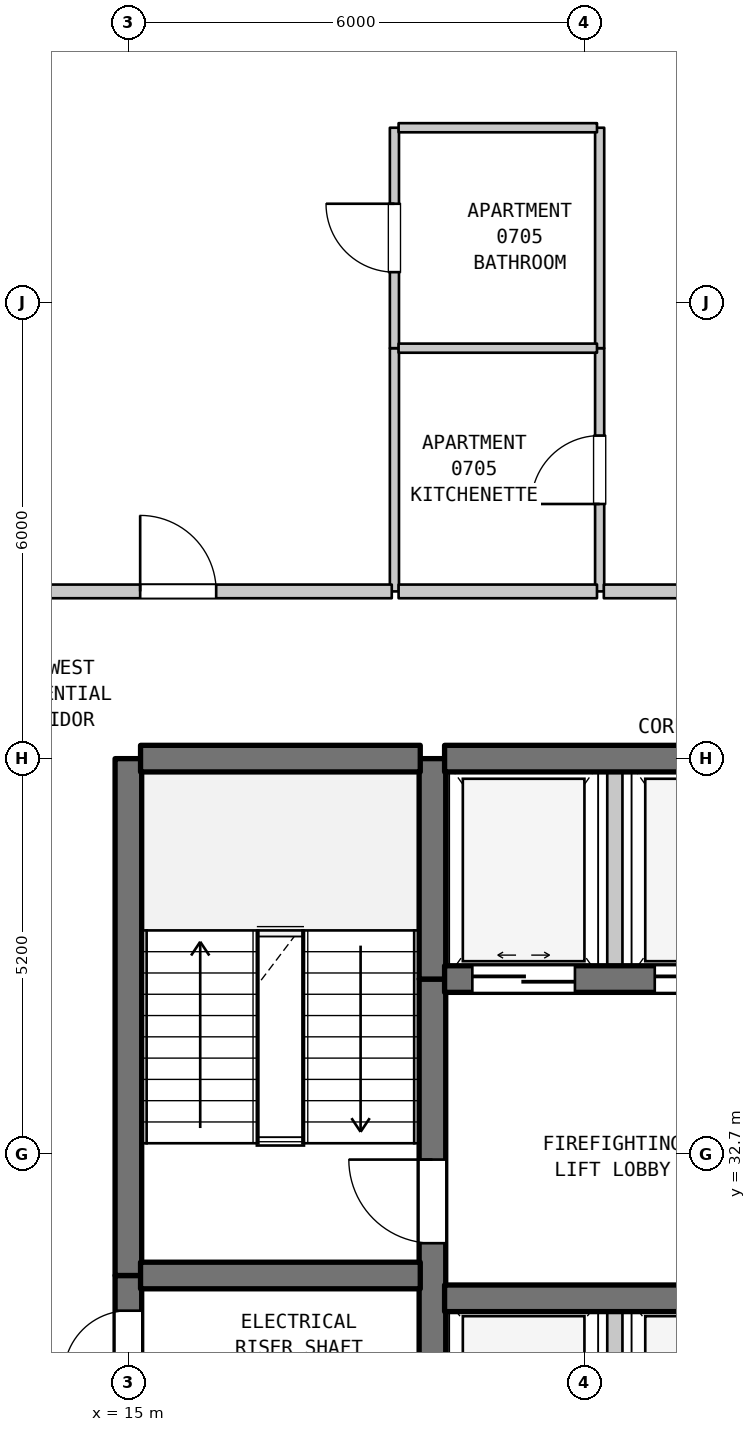
"""IFC4 building model, lengths in metres.
Left out: names, types, materials, properties, quantities, classifications, styles, units other than length and angle.
Written with IfcOpenShell. Run it as: python <this file> out.ifc"""

import sys

from ifc_helpers import new_model, si_unit, direction, frame, frame_2d, origin, place, context, subcontext, project, spatial, rectangle, extrude, element, fill, save


model = new_model("IFC4")
c1 = context("Model", 3, precision=1e-05, world=origin(), true_north=direction((0.0, 1.0)))
c2 = subcontext(c1, "Body", "Model", "MODEL_VIEW")
j1 = project(units=[si_unit("LENGTHUNIT", "METRE"), si_unit("PLANEANGLEUNIT", "RADIAN")], contexts=[c1])
p1 = place(None, origin())
s1 = spatial("IfcSite", under=j1, at=p1, CompositionType="ELEMENT")
p2 = place(p1, origin())
s2 = spatial("IfcBuilding", under=s1, at=p2, CompositionType="ELEMENT")
p3 = place(p2, frame((0.0, 0.0, 35.1)))
s3 = spatial("IfcBuildingStorey", under=s2, at=p3, CompositionType="ELEMENT", Elevation=35.1)
p4 = place(p3, frame((15.0, 29.5, 0.0), z_axis=(0.0, 0.0, 1.0), x_axis=(0.0, 1.0, 0.0)))
e1 = element("IfcWall", 1, at=p4, inside=s3, PredefinedType="SHEAR", context=c2, shape_type="SweptSolid", body=[
    extrude(rectangle(XDim=1.6, YDim=0.35, at=frame_2d((0.8, 0.0))), origin(), (0.0, 0.0, 1.0), 3.385),
])
p5 = place(p4, frame((0.287, 0.0, 0.0)))
e2 = element("IfcOpeningElement", 2, at=p5, cuts=e1, PredefinedType="OPENING", context=c2, shape_type="SweptSolid", body=[
    extrude(rectangle(XDim=0.85, YDim=2.1, at=frame_2d((0.425, 1.05))), frame((0.0, 0.185, 0.0), z_axis=(0.0, -1.0, 0.0), x_axis=(1.0, 0.0, 0.0)), (0.0, 0.0, 1.0), 0.37),
])
p6 = place(p3, frame((15.0, 31.1, 0.0), z_axis=(0.0, 0.0, 1.0), x_axis=(0.0, 1.0, 0.0)))
e3 = element("IfcWall", 3, at=p6, inside=s3, PredefinedType="SHEAR", context=c2, shape_type="SweptSolid", body=[
    extrude(rectangle(XDim=6.8, YDim=0.35, at=frame_2d((3.4, 0.0))), origin(), (0.0, 0.0, 1.0), 3.385),
])
p7 = place(p3, frame((18.5, 40.1, 0.0), z_axis=(0.0, 0.0, 1.0), x_axis=(0.0, 1.0, 0.0)))
e4 = element("IfcWall", 4, at=p7, inside=s3, PredefinedType="PARTITIONING", context=c2, shape_type="SweptSolid", body=[
    extrude(rectangle(XDim=3.2, YDim=0.12, at=frame_2d((1.6, 0.0))), origin(), (0.0, 0.0, 1.0), 3.385),
])
p8 = place(p3, frame((18.5, 43.3, 0.0), z_axis=(0.0, 0.0, 1.0), x_axis=(0.0, 1.0, 0.0)))
e5 = element("IfcWall", 5, at=p8, inside=s3, PredefinedType="PARTITIONING", context=c2, shape_type="SweptSolid", body=[
    extrude(rectangle(XDim=2.9, YDim=0.12, at=frame_2d((1.45, 0.0))), origin(), (0.0, 0.0, 1.0), 3.385),
])
p9 = place(p8, frame((1.0, 0.0, 0.0)))
e6 = element("IfcOpeningElement", 6, at=p9, cuts=e5, PredefinedType="OPENING", context=c2, shape_type="SweptSolid", body=[
    extrude(rectangle(XDim=0.9, YDim=2.1, at=frame_2d((0.45, 1.05))), frame((0.0, 0.07, 0.0), z_axis=(0.0, -1.0, 0.0), x_axis=(1.0, 0.0, 0.0)), (0.0, 0.0, 1.0), 0.14),
])
p10 = place(p3, frame((19.0, 29.5, 0.0), z_axis=(0.0, 0.0, 1.0), x_axis=(0.0, 1.0, 0.0)))
e7 = element("IfcWall", 7, at=p10, inside=s3, PredefinedType="SHEAR", context=c2, shape_type="SweptSolid", body=[
    extrude(rectangle(XDim=5.5, YDim=0.35, at=frame_2d((2.75, 0.0))), origin(), (0.0, 0.0, 1.0), 3.385),
])
p11 = place(p10, frame((2.025, 0.0, 0.0)))
e8 = element("IfcOpeningElement", 8, at=p11, cuts=e7, PredefinedType="OPENING", context=c2, shape_type="SweptSolid", body=[
    extrude(rectangle(XDim=1.1, YDim=2.15, at=frame_2d((0.55, 1.075))), frame((0.0, 0.185, 0.0), z_axis=(0.0, -1.0, 0.0), x_axis=(1.0, 0.0, 0.0)), (0.0, 0.0, 1.0), 0.37),
])
p12 = place(p3, frame((19.0, 35.0, 0.0), z_axis=(0.0, 0.0, 1.0), x_axis=(0.0, 1.0, 0.0)))
e9 = element("IfcWall", 9, at=p12, inside=s3, PredefinedType="SHEAR", context=c2, shape_type="SweptSolid", body=[
    extrude(rectangle(XDim=2.9, YDim=0.35, at=frame_2d((1.45, 0.0))), origin(), (0.0, 0.0, 1.0), 3.385),
])
p13 = place(p3, frame((21.2, 40.1, 0.0), z_axis=(0.0, 0.0, 1.0), x_axis=(0.0, 1.0, 0.0)))
e10 = element("IfcWall", 10, at=p13, inside=s3, PredefinedType="PARTITIONING", context=c2, shape_type="SweptSolid", body=[
    extrude(rectangle(XDim=3.2, YDim=0.12, at=frame_2d((1.6, 0.0))), origin(), (0.0, 0.0, 1.0), 3.385),
])
p14 = place(p13, frame((1.15, 0.0, 0.0)))
e11 = element("IfcOpeningElement", 11, at=p14, cuts=e10, PredefinedType="OPENING", context=c2, shape_type="SweptSolid", body=[
    extrude(rectangle(XDim=0.9, YDim=2.15, at=frame_2d((0.45, 1.075))), frame((0.0, 0.07, 0.0), z_axis=(0.0, -1.0, 0.0), x_axis=(1.0, 0.0, 0.0)), (0.0, 0.0, 1.0), 0.14),
])
p15 = place(p3, frame((21.2, 43.3, 0.0), z_axis=(0.0, 0.0, 1.0), x_axis=(0.0, 1.0, 0.0)))
e12 = element("IfcWall", 12, at=p15, inside=s3, PredefinedType="PARTITIONING", context=c2, shape_type="SweptSolid", body=[
    extrude(rectangle(XDim=2.9, YDim=0.12, at=frame_2d((1.45, 0.0))), origin(), (0.0, 0.0, 1.0), 3.385),
])
p16 = place(p3, frame((21.4, 28.2, 0.0), z_axis=(0.0, 0.0, 1.0), x_axis=(0.0, 1.0, 0.0)))
e13 = element("IfcWall", 13, at=p16, inside=s3, PredefinedType="STANDARD", context=c2, shape_type="SweptSolid", body=[
    extrude(rectangle(XDim=2.6, YDim=0.2, at=frame_2d((1.3, 0.0))), origin(), (0.0, 0.0, 1.0), 3.385),
])
p17 = place(p3, frame((21.4, 35.0, 0.0), z_axis=(0.0, 0.0, 1.0), x_axis=(0.0, 1.0, 0.0)))
e14 = element("IfcWall", 14, at=p17, inside=s3, PredefinedType="STANDARD", context=c2, shape_type="SweptSolid", body=[
    extrude(rectangle(XDim=2.9, YDim=0.2, at=frame_2d((1.45, 0.0))), origin(), (0.0, 0.0, 1.0), 3.385),
])
p18 = place(p3, frame((19.16, 30.8, 0.0), z_axis=(0.0, 0.0, 1.0), x_axis=(1.0, 0.0, 0.0)))
e15 = element("IfcWall", 15, at=p18, inside=s3, PredefinedType="SHEAR", context=c2, shape_type="SweptSolid", body=[
    extrude(rectangle(XDim=4.48, YDim=0.35, at=frame_2d((2.24, 0.0))), origin(), (0.0, 0.0, 1.0), 3.385),
])
p19 = place(p3, frame((15.16, 31.1, 0.0), z_axis=(0.0, 0.0, 1.0), x_axis=(1.0, 0.0, 0.0)))
e16 = element("IfcWall", 16, at=p19, inside=s3, PredefinedType="SHEAR", context=c2, shape_type="SweptSolid", body=[
    extrude(rectangle(XDim=3.68, YDim=0.35, at=frame_2d((1.84, 0.0))), origin(), (0.0, 0.0, 1.0), 3.385),
])
p20 = place(p3, frame((19.16, 35.0, 0.0), z_axis=(0.0, 0.0, 1.0), x_axis=(1.0, 0.0, 0.0)))
e17 = element("IfcWall", 17, at=p20, inside=s3, PredefinedType="SHEAR", context=c2, shape_type="SweptSolid", body=[
    extrude(rectangle(XDim=11.48, YDim=0.35, at=frame_2d((5.74, 0.0))), origin(), (0.0, 0.0, 1.0), 3.385),
])
p21 = place(p20, frame((0.365, 0.0, 0.0)))
e18 = element("IfcOpeningElement", 18, at=p21, cuts=e17, PredefinedType="OPENING", context=c2, shape_type="SweptSolid", body=[
    extrude(rectangle(XDim=1.35, YDim=2.2, at=frame_2d((0.675, 1.1))), frame((0.0, 0.185, 0.0), z_axis=(0.0, -1.0, 0.0), x_axis=(1.0, 0.0, 0.0)), (0.0, 0.0, 1.0), 0.37),
])
p22 = place(p20, frame((2.765, 0.0, 0.0)))
e19 = element("IfcOpeningElement", 19, at=p22, cuts=e17, PredefinedType="OPENING", context=c2, shape_type="SweptSolid", body=[
    extrude(rectangle(XDim=1.35, YDim=2.2, at=frame_2d((0.675, 1.1))), frame((0.0, 0.185, 0.0), z_axis=(0.0, -1.0, 0.0), x_axis=(1.0, 0.0, 0.0)), (0.0, 0.0, 1.0), 0.37),
])
p23 = place(p20, frame((4.915, 0.0, 0.0)))
e20 = element("IfcOpeningElement", 20, at=p23, cuts=e17, PredefinedType="OPENING", context=c2, shape_type="SweptSolid", body=[
    extrude(rectangle(XDim=1.2, YDim=2.2, at=frame_2d((0.6, 1.1))), frame((0.0, 0.185, 0.0), z_axis=(0.0, -1.0, 0.0), x_axis=(1.0, 0.0, 0.0)), (0.0, 0.0, 1.0), 0.37),
])
p24 = place(p20, frame((6.665, 0.0, 0.0)))
e21 = element("IfcOpeningElement", 21, at=p24, cuts=e17, PredefinedType="OPENING", context=c2, shape_type="SweptSolid", body=[
    extrude(rectangle(XDim=1.2, YDim=2.2, at=frame_2d((0.6, 1.1))), frame((0.0, 0.185, 0.0), z_axis=(0.0, -1.0, 0.0), x_axis=(1.0, 0.0, 0.0)), (0.0, 0.0, 1.0), 0.37),
])
p25 = place(p20, frame((8.415, 0.0, 0.0)))
e22 = element("IfcOpeningElement", 22, at=p25, cuts=e17, PredefinedType="OPENING", context=c2, shape_type="SweptSolid", body=[
    extrude(rectangle(XDim=1.2, YDim=2.2, at=frame_2d((0.6, 1.1))), frame((0.0, 0.185, 0.0), z_axis=(0.0, -1.0, 0.0), x_axis=(1.0, 0.0, 0.0)), (0.0, 0.0, 1.0), 0.37),
])
p26 = place(p20, frame((10.16, 0.0, 0.0)))
e23 = element("IfcOpeningElement", 23, at=p26, cuts=e17, PredefinedType="OPENING", context=c2, shape_type="SweptSolid", body=[
    extrude(rectangle(XDim=1.2, YDim=2.2, at=frame_2d((0.6, 1.1))), frame((0.0, 0.185, 0.0), z_axis=(0.0, -1.0, 0.0), x_axis=(1.0, 0.0, 0.0)), (0.0, 0.0, 1.0), 0.37),
])
p27 = place(p3, frame((15.16, 37.9, 0.0), z_axis=(0.0, 0.0, 1.0), x_axis=(1.0, 0.0, 0.0)))
e24 = element("IfcWall", 24, at=p27, inside=s3, PredefinedType="SHEAR", context=c2, shape_type="SweptSolid", body=[
    extrude(rectangle(XDim=3.68, YDim=0.35, at=frame_2d((1.84, 0.0))), origin(), (0.0, 0.0, 1.0), 3.385),
])
p28 = place(p3, frame((19.16, 37.9, 0.0), z_axis=(0.0, 0.0, 1.0), x_axis=(1.0, 0.0, 0.0)))
e25 = element("IfcWall", 25, at=p28, inside=s3, PredefinedType="SHEAR", context=c2, shape_type="SweptSolid", body=[
    extrude(rectangle(XDim=11.48, YDim=0.35, at=frame_2d((5.74, 0.0))), origin(), (0.0, 0.0, 1.0), 3.385),
])
p29 = place(p3, frame((12.875, 40.1, 0.0), z_axis=(0.0, 0.0, 1.0), x_axis=(1.0, 0.0, 0.0)))
e26 = element("IfcWall", 26, at=p29, inside=s3, PredefinedType="STANDARD", context=c2, shape_type="SweptSolid", body=[
    extrude(rectangle(XDim=5.59, YDim=0.18, at=frame_2d((2.795, 0.0))), origin(), (0.0, 0.0, 1.0), 3.385),
])
p30 = place(p29, frame((2.28, 0.0, 0.0)))
e27 = element("IfcOpeningElement", 27, at=p30, cuts=e26, PredefinedType="OPENING", context=c2, shape_type="SweptSolid", body=[
    extrude(rectangle(XDim=1.0, YDim=2.15, at=frame_2d((0.5, 1.075))), frame((0.0, 0.1, 0.0), z_axis=(0.0, -1.0, 0.0), x_axis=(1.0, 0.0, 0.0)), (0.0, 0.0, 1.0), 0.2),
])
p31 = place(p3, frame((18.555, 40.1, 0.0), z_axis=(0.0, 0.0, 1.0), x_axis=(1.0, 0.0, 0.0)))
e28 = element("IfcWall", 28, at=p31, inside=s3, PredefinedType="STANDARD", context=c2, shape_type="SweptSolid", body=[
    extrude(rectangle(XDim=2.61, YDim=0.18, at=frame_2d((1.305, 0.0))), origin(), (0.0, 0.0, 1.0), 3.385),
])
p32 = place(p3, frame((21.255, 40.1, 0.0), z_axis=(0.0, 0.0, 1.0), x_axis=(1.0, 0.0, 0.0)))
e29 = element("IfcWall", 29, at=p32, inside=s3, PredefinedType="STANDARD", context=c2, shape_type="SweptSolid", body=[
    extrude(rectangle(XDim=2.41, YDim=0.18, at=frame_2d((1.205, 0.0))), origin(), (0.0, 0.0, 1.0), 3.385),
])
for number, where, z_axis, x_axis in (
    (30, (18.555, 43.3, 0.0), (0.0, 0.0, 1.0), (1.0, 0.0, 0.0)),
    (31, (18.555, 46.2, 0.0), (0.0, 0.0, 1.0), (1.0, 0.0, 0.0)),
):
    element("IfcWall", number, at=place(p3, frame(where, z_axis=z_axis, x_axis=x_axis)), inside=s3, PredefinedType="PARTITIONING", context=c2, shape_type="SweptSolid", body=[
        extrude(rectangle(XDim=2.61, YDim=0.12, at=frame_2d((1.305, 0.0))), origin(), (0.0, 0.0, 1.0), 3.385),
    ])
p33 = place(p5, origin())
e32 = element("IfcDoor", 32, at=p33, inside=s3, OperationType="SINGLE_SWING_LEFT", PredefinedType="DOOR", context=c2, shape_type="SweptSolid", body=[
    extrude(rectangle(XDim=0.85, YDim=2.1, at=frame_2d((0.425, 1.05))), frame((0.0, 0.025, 0.0), z_axis=(0.0, -1.0, 0.0), x_axis=(1.0, 0.0, 0.0)), (0.0, 0.0, 1.0), 0.05),
])
fill(e2, e32)
p34 = place(p9, origin())
e33 = element("IfcDoor", 33, at=p34, inside=s3, OperationType="SINGLE_SWING_RIGHT", PredefinedType="DOOR", context=c2, shape_type="SweptSolid", body=[
    extrude(rectangle(XDim=0.9, YDim=2.1, at=frame_2d((0.45, 1.05))), frame((0.0, 0.025, 0.0), z_axis=(0.0, -1.0, 0.0), x_axis=(1.0, 0.0, 0.0)), (0.0, 0.0, 1.0), 0.05),
])
fill(e6, e33)
p35 = place(p11, origin())
e34 = element("IfcDoor", 34, at=p35, inside=s3, OperationType="SINGLE_SWING_RIGHT", PredefinedType="DOOR", context=c2, shape_type="SweptSolid", body=[
    extrude(rectangle(XDim=1.1, YDim=2.15, at=frame_2d((0.55, 1.075))), frame((0.0, 0.025, 0.0), z_axis=(0.0, -1.0, 0.0), x_axis=(1.0, 0.0, 0.0)), (0.0, 0.0, 1.0), 0.05),
])
fill(e8, e34)
p36 = place(p14, origin())
e35 = element("IfcDoor", 35, at=p36, inside=s3, OperationType="SINGLE_SWING_LEFT", PredefinedType="DOOR", context=c2, shape_type="SweptSolid", body=[
    extrude(rectangle(XDim=0.9, YDim=2.15, at=frame_2d((0.45, 1.075))), frame((0.0, 0.025, 0.0), z_axis=(0.0, -1.0, 0.0), x_axis=(1.0, 0.0, 0.0)), (0.0, 0.0, 1.0), 0.05),
])
fill(e11, e35)
p37 = place(p21, origin())
e36 = element("IfcDoor", 36, at=p37, inside=s3, OperationType="DOUBLE_DOOR_SLIDING", PredefinedType="DOOR", context=c2, shape_type="SweptSolid", body=[
    extrude(rectangle(XDim=1.35, YDim=2.2, at=frame_2d((0.675, 1.1))), frame((0.0, 0.025, 0.0), z_axis=(0.0, -1.0, 0.0), x_axis=(1.0, 0.0, 0.0)), (0.0, 0.0, 1.0), 0.05),
])
fill(e18, e36)
p38 = place(p22, origin())
e37 = element("IfcDoor", 37, at=p38, inside=s3, OperationType="DOUBLE_DOOR_SLIDING", PredefinedType="DOOR", context=c2, shape_type="SweptSolid", body=[
    extrude(rectangle(XDim=1.35, YDim=2.2, at=frame_2d((0.675, 1.1))), frame((0.0, 0.025, 0.0), z_axis=(0.0, -1.0, 0.0), x_axis=(1.0, 0.0, 0.0)), (0.0, 0.0, 1.0), 0.05),
])
fill(e19, e37)
p39 = place(p30, origin())
e38 = element("IfcDoor", 38, at=p39, inside=s3, OperationType="SINGLE_SWING_LEFT", PredefinedType="DOOR", context=c2, shape_type="SweptSolid", body=[
    extrude(rectangle(XDim=1.0, YDim=2.15, at=frame_2d((0.5, 1.075))), frame((0.0, 0.025, 0.0), z_axis=(0.0, -1.0, 0.0), x_axis=(1.0, 0.0, 0.0)), (0.0, 0.0, 1.0), 0.05),
])
fill(e27, e38)
save(model, sys.argv[1])
